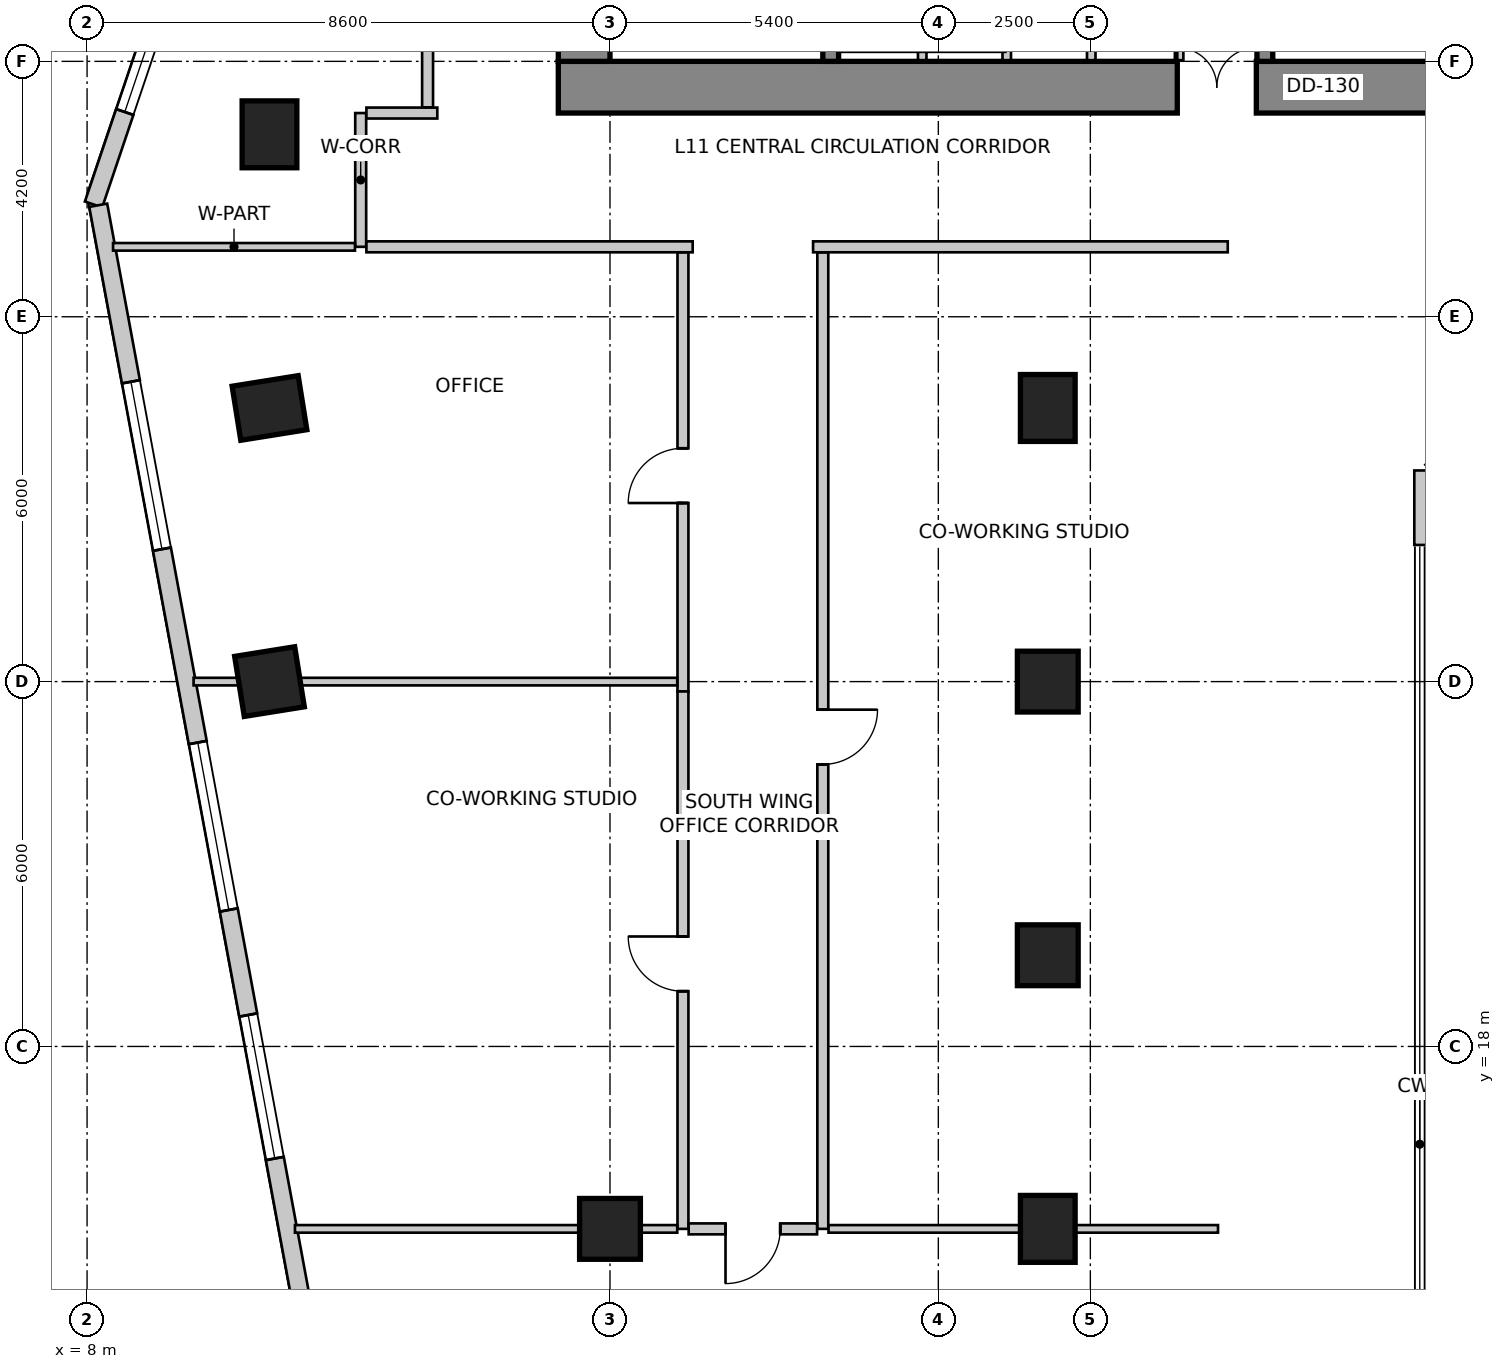
"""IFC4 building model, lengths in metres.
Left out: names, types, materials, properties, quantities, classifications, styles, units other than length and angle.
Written with IfcOpenShell. Run it as: python <this file> out.ifc"""

import sys

from ifc_helpers import new_model, si_unit, direction, frame, frame_2d, origin, origin_2d, place, context, subcontext, project, spatial, rectangle, extrude, source, transform, mapped, element, fill, save


model = new_model("IFC4")
c1 = context("Model", 3, precision=1e-05, world=origin(), true_north=direction((0.0, 1.0)))
c2 = subcontext(c1, "Body", "Model", "MODEL_VIEW")
j1 = project(units=[si_unit("LENGTHUNIT", "METRE"), si_unit("PLANEANGLEUNIT", "RADIAN")], contexts=[c1])
p1 = place(None, origin())
s1 = spatial("IfcSite", under=j1, at=p1, CompositionType="ELEMENT")
p2 = place(p1, origin())
s2 = spatial("IfcBuilding", under=s1, at=p2, CompositionType="ELEMENT")
p3 = place(p2, frame((0.0, 0.0, 47.0)))
s3 = spatial("IfcBuildingStorey", under=s2, at=p3, CompositionType="ELEMENT", Elevation=47.0)
p4 = place(p3, frame((15.75, 33.775, 0.0), z_axis=(0.0, 0.0, 1.0), x_axis=(1.0, 0.0, 0.0)))
e1 = element("IfcWall", 1, at=p4, inside=s3, PredefinedType="SHEAR", context=c2, shape_type="SweptSolid", body=[
    extrude(rectangle(XDim=16.1, YDim=0.85, at=frame_2d((8.05, 0.0))), origin(), (0.0, 0.0, 1.0), 4.0),
])
m1 = source(origin(), c2, "Body", "SweptSolid", [
    extrude(rectangle(XDim=1.3, YDim=2.15, at=frame_2d((0.65, 1.075))), frame((0.0, 0.435, 0.0), z_axis=(0.0, -1.0, 0.0), x_axis=(1.0, 0.0, 0.0)), (0.0, 0.0, 1.0), 0.87),
])
p5 = place(p4, frame((10.18, 0.0, 0.0)))
e2 = element("IfcOpeningElement", 2, at=p5, cuts=e1, PredefinedType="OPENING", context=c2, shape_type="MappedRepresentation", body=[
    mapped(m1, transform((0.0, 0.0, 0.0), scale=1.0)),
])
p6 = place(p3, frame((16.175, 34.2, 0.0), z_axis=(0.0, 0.0, 1.0), x_axis=(0.0, 1.0, 0.0)))
e3 = element("IfcWall", 3, at=p6, inside=s3, PredefinedType="SHEAR", context=c2, shape_type="SweptSolid", body=[
    extrude(rectangle(XDim=11.4, YDim=0.85, at=frame_2d((5.7, 0.0))), origin(), (0.0, 0.0, 1.0), 4.0),
])
m2 = source(origin(), c2, "Body", "SweptSolid", [
    extrude(rectangle(XDim=1.1, YDim=2.15, at=frame_2d((0.55, 1.075))), frame((0.0, 0.435, 0.0), z_axis=(0.0, -1.0, 0.0), x_axis=(1.0, 0.0, 0.0)), (0.0, 0.0, 1.0), 0.87),
])
p7 = place(p6, frame((7.15, 0.0, 0.0)))
e4 = element("IfcOpeningElement", 4, at=p7, cuts=e3, PredefinedType="OPENING", context=c2, shape_type="MappedRepresentation", body=[
    mapped(m2, transform((0.0, 0.0, 0.0), scale=1.0)),
])
p8 = place(p3, frame((20.23, 34.2, 0.0), z_axis=(0.0, 0.0, 1.0), x_axis=(0.0, 1.0, 0.0)))
e5 = element("IfcWall", 5, at=p8, inside=s3, PredefinedType="SHEAR", context=c2, shape_type="SweptSolid", body=[
    extrude(rectangle(XDim=9.06, YDim=0.26, at=frame_2d((4.53, 0.0))), origin(), (0.0, 0.0, 1.0), 4.0),
])
m3 = source(origin(), c2, "Body", "SweptSolid", [
    extrude(rectangle(XDim=1.1, YDim=2.15, at=frame_2d((0.55, 1.075))), frame((0.0, 0.14, 0.0), z_axis=(0.0, -1.0, 0.0), x_axis=(1.0, 0.0, 0.0)), (0.0, 0.0, 1.0), 0.28),
])
p9 = place(p8, frame((7.45, 0.0, 0.0)))
e6 = element("IfcOpeningElement", 6, at=p9, cuts=e5, PredefinedType="OPENING", context=c2, shape_type="MappedRepresentation", body=[
    mapped(m3, transform((0.0, 0.0, 0.0), scale=1.0)),
])
p10 = place(p3, frame((27.37, 34.2, 0.0), z_axis=(0.0, 0.0, 1.0), x_axis=(0.0, 1.0, 0.0)))
e7 = element("IfcWall", 7, at=p10, inside=s3, PredefinedType="SHEAR", context=c2, shape_type="SweptSolid", body=[
    extrude(rectangle(XDim=9.06, YDim=0.26, at=frame_2d((4.53, 0.0))), origin(), (0.0, 0.0, 1.0), 4.0),
])
p11 = place(p10, frame((7.45, 0.0, 0.0)))
e8 = element("IfcOpeningElement", 8, at=p11, cuts=e7, PredefinedType="OPENING", context=c2, shape_type="MappedRepresentation", body=[
    mapped(m3, transform((0.0, 0.0, 0.0), scale=1.0)),
])
m4 = source(origin(), c2, "Body", "SweptSolid", [
    extrude(rectangle(XDim=0.9, YDim=1.1, at=origin_2d()), origin(), (0.0, 0.0, 1.0), 4.0),
])
for number, where, z_axis, x_axis in (
    (9, (11.0, 33.0, 0.0), (0.0, 0.0, 1.0), (1.0, 0.0, 0.0)),
    (10, (11.0, 28.5, 0.0), (0.0, 0.0, 1.0), (0.158, -0.987, 0.0)),
):
    element("IfcColumn", number, at=place(p3, frame(where, z_axis=z_axis, x_axis=x_axis)), inside=s3, PredefinedType="COLUMN", context=c2, shape_type="MappedRepresentation", body=[
        mapped(m4, transform((0.0, 0.0, 0.0), scale=1.0)),
    ])
m5 = source(origin(), c2, "Body", "SweptSolid", [
    extrude(rectangle(XDim=1.0, YDim=1.0, at=origin_2d()), origin(), (0.0, 0.0, 1.0), 4.0),
])
p12 = place(p3, frame((11.0, 24.0, 0.0), z_axis=(0.0, 0.0, 1.0), x_axis=(0.158158067254, -0.987413806751, 0.0)))
e11 = element("IfcColumn", 11, at=p12, inside=s3, PredefinedType="COLUMN", context=c2, shape_type="MappedRepresentation", body=[
    mapped(m5, transform((0.0, 0.0, 0.0), scale=1.0)),
])
p13 = place(p3, frame((23.8, 28.5, 0.0), z_axis=(0.0, 0.0, 1.0), x_axis=(1.0, 0.0, 0.0)))
e12 = element("IfcColumn", 12, at=p13, inside=s3, PredefinedType="COLUMN", context=c2, shape_type="MappedRepresentation", body=[
    mapped(m4, transform((0.0, 0.0, 0.0), scale=1.0)),
])
for number, where, z_axis, x_axis in (
    (13, (23.8, 24.0, 0.0), (0.0, 0.0, 1.0), (1.0, 0.0, 0.0)),
    (14, (23.8, 19.5, 0.0), (0.0, 0.0, 1.0), (1.0, 0.0, 0.0)),
):
    element("IfcColumn", number, at=place(p3, frame(where, z_axis=z_axis, x_axis=x_axis)), inside=s3, PredefinedType="COLUMN", context=c2, shape_type="MappedRepresentation", body=[
        mapped(m5, transform((0.0, 0.0, 0.0), scale=1.0)),
    ])
p14 = place(p3, frame((23.8, 15.0, 0.0), z_axis=(0.0, 0.0, 1.0), x_axis=(1.0, 0.0, 0.0)))
e15 = element("IfcColumn", 15, at=p14, inside=s3, PredefinedType="COLUMN", context=c2, shape_type="MappedRepresentation", body=[
    mapped(m4, transform((0.0, 0.0, 0.0), scale=1.0)),
])
p15 = place(p3, frame((16.6, 15.0, 0.0), z_axis=(0.0, 0.0, 1.0), x_axis=(1.0, 0.0, 0.0)))
e16 = element("IfcColumn", 16, at=p15, inside=s3, PredefinedType="COLUMN", context=c2, shape_type="MappedRepresentation", body=[
    mapped(m5, transform((0.0, 0.0, 0.0), scale=1.0)),
])
p16 = place(p3, frame((29.978, 26.247, 0.0), z_axis=(0.0, 0.0, 1.0), x_axis=(0.0, 1.0, 0.0)))
e17 = element("IfcWall", 17, at=p16, inside=s3, PredefinedType="SOLIDWALL", context=c2, shape_type="SweptSolid", body=[
    extrude(rectangle(XDim=1.225, YDim=0.3, at=frame_2d((0.613, 0.0))), origin(), (0.0, 0.0, 1.0), 3.75),
])
p17 = place(p3, frame((13.269, 47.134, 0.0), z_axis=(0.0, 0.0, 1.0), x_axis=(-0.319920423265, -0.947444416722, 0.0)))
e18 = element("IfcWall", 18, at=p17, inside=s3, PredefinedType="SOLIDWALL", context=c2, shape_type="SweptSolid", body=[
    extrude(rectangle(XDim=16.135, YDim=0.3, at=frame_2d((8.067, 0.0))), origin(), (0.0, 0.0, 1.0), 3.75),
])
m6 = source(origin(), c2, "Body", "SweptSolid", [
    extrude(rectangle(XDim=2.4, YDim=2.2, at=frame_2d((1.2, 1.1))), frame((0.0, 0.16, 0.0), z_axis=(0.0, -1.0, 0.0), x_axis=(1.0, 0.0, 0.0)), (0.0, 0.0, 1.0), 0.32),
])
p18 = place(p17, frame((2.188, 0.0, 0.85)))
e19 = element("IfcOpeningElement", 19, at=p18, cuts=e18, PredefinedType="OPENING", context=c2, shape_type="MappedRepresentation", body=[
    mapped(m6, transform((0.0, 0.0, 0.0), scale=1.0)),
])
m7 = source(origin(), c2, "Body", "SweptSolid", [
    extrude(rectangle(XDim=2.8, YDim=2.4, at=frame_2d((1.4, 1.2))), frame((0.0, 0.16, 0.0), z_axis=(0.0, -1.0, 0.0), x_axis=(1.0, 0.0, 0.0)), (0.0, 0.0, 1.0), 0.32),
])
p19 = place(p17, frame((6.959, 0.0, 0.85)))
e20 = element("IfcOpeningElement", 20, at=p19, cuts=e18, PredefinedType="OPENING", context=c2, shape_type="MappedRepresentation", body=[
    mapped(m7, transform((0.0, 0.0, 0.0), scale=1.0)),
])
p20 = place(p17, frame((12.13, 0.0, 0.85)))
e21 = element("IfcOpeningElement", 21, at=p20, cuts=e18, PredefinedType="OPENING", context=c2, shape_type="MappedRepresentation", body=[
    mapped(m6, transform((0.0, 0.0, 0.0), scale=1.0)),
])
p21 = place(p3, frame((8.183, 31.833, 0.0), z_axis=(0.0, 0.0, 1.0), x_axis=(0.18216364648, -0.983268226834, 0.0)))
e22 = element("IfcWall", 22, at=p21, inside=s3, PredefinedType="SOLIDWALL", context=c2, shape_type="SweptSolid", body=[
    extrude(rectangle(XDim=26.678, YDim=0.3, at=frame_2d((13.339, 0.0))), origin(), (0.0, 0.0, 1.0), 3.75),
])
p22 = place(p21, frame((2.952, 0.0, 0.85)))
e23 = element("IfcOpeningElement", 23, at=p22, cuts=e22, PredefinedType="OPENING", context=c2, shape_type="MappedRepresentation", body=[
    mapped(m7, transform((0.0, 0.0, 0.0), scale=1.0)),
])
p23 = place(p21, frame((8.986, 0.0, 0.85)))
e24 = element("IfcOpeningElement", 24, at=p23, cuts=e22, PredefinedType="OPENING", context=c2, shape_type="MappedRepresentation", body=[
    mapped(m7, transform((0.0, 0.0, 0.0), scale=1.0)),
])
p24 = place(p21, frame((13.543, 0.0, 0.85)))
e25 = element("IfcOpeningElement", 25, at=p24, cuts=e22, PredefinedType="OPENING", context=c2, shape_type="MappedRepresentation", body=[
    mapped(m6, transform((0.0, 0.0, 0.0), scale=1.0)),
])
p25 = place(p21, frame((18.211, 0.0, 0.85)))
e26 = element("IfcOpeningElement", 26, at=p25, cuts=e22, PredefinedType="OPENING", context=c2, shape_type="MappedRepresentation", body=[
    mapped(m7, transform((0.0, 0.0, 0.0), scale=1.0)),
])
p26 = place(p21, frame((22.909, 0.0, 0.85)))
e27 = element("IfcOpeningElement", 27, at=p26, cuts=e22, PredefinedType="OPENING", context=c2, shape_type="MappedRepresentation", body=[
    mapped(m6, transform((0.0, 0.0, 0.0), scale=1.0)),
])
for number, where, z_axis, x_axis in (
    (28, (25.96, 34.22, 0.0), (0.0, 0.0, 1.0), (0.0, 1.0, 0.0)),
    (29, (21.735, 34.22, 0.0), (0.0, 0.0, 1.0), (0.0, 1.0, 0.0)),
    (30, (23.125, 34.22, 0.0), (0.0, 0.0, 1.0), (0.0, 1.0, 0.0)),
    (31, (24.515, 34.22, 0.0), (0.0, 0.0, 1.0), (0.0, 1.0, 0.0)),
):
    element("IfcWall", number, at=place(p3, frame(where, z_axis=z_axis, x_axis=x_axis)), inside=s3, PredefinedType="SOLIDWALL", context=c2, shape_type="SweptSolid", body=[
        extrude(rectangle(XDim=1.62, YDim=0.14, at=frame_2d((0.81, 0.0))), origin(), (0.0, 0.0, 1.0), 3.042),
    ])
p27 = place(p3, frame((12.5, 31.15, 0.0), z_axis=(0.0, 0.0, 1.0), x_axis=(0.0, 1.0, 0.0)))
e32 = element("IfcWall", 32, at=p27, inside=s3, PredefinedType="PARTITIONING", context=c2, shape_type="SweptSolid", body=[
    extrude(rectangle(XDim=2.2, YDim=0.18, at=frame_2d((1.1, 0.0))), origin(), (0.0, 0.0, 1.0), 3.434),
])
p28 = place(p3, frame((12.594, 33.35, 0.0), z_axis=(0.0, 0.0, 1.0), x_axis=(1.0, 0.0, 0.0)))
e33 = element("IfcWall", 33, at=p28, inside=s3, PredefinedType="PARTITIONING", context=c2, shape_type="SweptSolid", body=[
    extrude(rectangle(XDim=1.166, YDim=0.18, at=frame_2d((0.583, 0.0))), origin(), (0.0, 0.0, 1.0), 3.75),
])
p29 = place(p3, frame((17.96, 31.15, 0.0), z_axis=(0.0, 0.0, 1.0), x_axis=(-1.0, 0.0, 0.0)))
e34 = element("IfcWall", 34, at=p29, inside=s3, PredefinedType="PARTITIONING", context=c2, shape_type="SweptSolid", body=[
    extrude(rectangle(XDim=5.366, YDim=0.18, at=frame_2d((2.683, 0.0))), origin(), (0.0, 0.0, 1.0), 3.434),
])
p30 = place(p3, frame((26.76, 31.15, 0.0), z_axis=(0.0, 0.0, 1.0), x_axis=(-1.0, 0.0, 0.0)))
e35 = element("IfcWall", 35, at=p30, inside=s3, PredefinedType="PARTITIONING", context=c2, shape_type="SweptSolid", body=[
    extrude(rectangle(XDim=6.82, YDim=0.18, at=frame_2d((3.41, 0.0))), origin(), (0.0, 0.0, 1.0), 3.434),
])
p31 = place(p3, frame((13.6, 33.444, 0.0), z_axis=(0.0, 0.0, 1.0), x_axis=(0.0, 1.0, 0.0)))
e36 = element("IfcWall", 36, at=p31, inside=s3, PredefinedType="PARTITIONING", context=c2, shape_type="SweptSolid", body=[
    extrude(rectangle(XDim=13.896, YDim=0.18, at=frame_2d((6.948, 0.0))), origin(), (0.0, 0.0, 1.0), 2.892),
])
m8 = source(origin(), c2, "Body", "SweptSolid", [
    extrude(rectangle(XDim=0.9, YDim=2.15, at=frame_2d((0.45, 1.075))), frame((0.0, 0.1, 0.0), z_axis=(0.0, -1.0, 0.0), x_axis=(1.0, 0.0, 0.0)), (0.0, 0.0, 1.0), 0.2),
])
p32 = place(p31, frame((4.144, 0.0, 0.0)))
e37 = element("IfcOpeningElement", 37, at=p32, cuts=e36, PredefinedType="OPENING", context=c2, shape_type="MappedRepresentation", body=[
    mapped(m8, transform((0.0, 0.0, 0.0), scale=1.0)),
])
p33 = place(p3, frame((12.406, 31.15, 0.0), z_axis=(0.0, 0.0, 1.0), x_axis=(-1.0, 0.0, 0.0)))
e38 = element("IfcWall", 38, at=p33, inside=s3, PredefinedType="PARTITIONING", context=c2, shape_type="SweptSolid", body=[
    extrude(rectangle(XDim=3.979, YDim=0.125, at=frame_2d((1.99, 0.0))), origin(), (0.0, 0.0, 1.0), 2.892),
])
p34 = place(p3, frame((17.8, 23.84, 0.0), z_axis=(0.0, 0.0, 1.0), x_axis=(0.0, 1.0, 0.0)))
e39 = element("IfcWall", 39, at=p34, inside=s3, PredefinedType="PARTITIONING", context=c2, shape_type="SweptSolid", body=[
    extrude(rectangle(XDim=7.216, YDim=0.18, at=frame_2d((3.608, 0.0))), origin(), (0.0, 0.0, 1.0), 3.125),
])
p35 = place(p34, frame((3.097, 0.0, 0.0)))
e40 = element("IfcOpeningElement", 40, at=p35, cuts=e39, PredefinedType="OPENING", context=c2, shape_type="MappedRepresentation", body=[
    mapped(m8, transform((0.0, 0.0, 0.0), scale=1.0)),
])
p36 = place(p3, frame((17.8, 15.0, 0.0), z_axis=(0.0, 0.0, 1.0), x_axis=(0.0, 1.0, 0.0)))
e41 = element("IfcWall", 41, at=p36, inside=s3, PredefinedType="PARTITIONING", context=c2, shape_type="SweptSolid", body=[
    extrude(rectangle(XDim=8.838, YDim=0.18, at=frame_2d((4.419, 0.0))), origin(), (0.0, 0.0, 1.0), 2.892),
])
p37 = place(p36, frame((3.908, 0.0, 0.0)))
e42 = element("IfcOpeningElement", 42, at=p37, cuts=e41, PredefinedType="OPENING", context=c2, shape_type="MappedRepresentation", body=[
    mapped(m8, transform((0.0, 0.0, 0.0), scale=1.0)),
])
p38 = place(p3, frame((20.1, 31.056, 0.0), z_axis=(0.0, 0.0, 1.0), x_axis=(0.0, -1.0, 0.0)))
e43 = element("IfcWall", 43, at=p38, inside=s3, PredefinedType="PARTITIONING", context=c2, shape_type="SweptSolid", body=[
    extrude(rectangle(XDim=16.056, YDim=0.18, at=frame_2d((8.028, 0.0))), origin(), (0.0, 0.0, 1.0), 2.892),
])
p39 = place(p38, frame((7.518, 0.0, 0.0)))
e44 = element("IfcOpeningElement", 44, at=p39, cuts=e43, PredefinedType="OPENING", context=c2, shape_type="MappedRepresentation", body=[
    mapped(m8, transform((0.0, 0.0, 0.0), scale=1.0)),
])
p40 = place(p3, frame((20.006, 15.0, 0.0), z_axis=(0.0, 0.0, 1.0), x_axis=(-1.0, 0.0, 0.0)))
e45 = element("IfcWall", 45, at=p40, inside=s3, PredefinedType="PARTITIONING", context=c2, shape_type="SweptSolid", body=[
    extrude(rectangle(XDim=2.112, YDim=0.18, at=frame_2d((1.056, 0.0))), origin(), (0.0, 0.0, 1.0), 2.892),
])
p41 = place(p40, frame((0.606, 0.0, 0.0)))
e46 = element("IfcOpeningElement", 46, at=p41, cuts=e45, PredefinedType="OPENING", context=c2, shape_type="MappedRepresentation", body=[
    mapped(m8, transform((0.0, 0.0, 0.0), scale=1.0)),
])
p42 = place(p3, frame((17.706, 24.0, 0.0), z_axis=(0.0, 0.0, 1.0), x_axis=(-1.0, 0.0, 0.0)))
e47 = element("IfcWall", 47, at=p42, inside=s3, PredefinedType="PARTITIONING", context=c2, shape_type="SweptSolid", body=[
    extrude(rectangle(XDim=7.954, YDim=0.125, at=frame_2d((3.977, 0.0))), origin(), (0.0, 0.0, 1.0), 2.892),
])
p43 = place(p3, frame((17.706, 15.0, 0.0), z_axis=(0.0, 0.0, 1.0), x_axis=(-1.0, 0.0, 0.0)))
e48 = element("IfcWall", 48, at=p43, inside=s3, PredefinedType="PARTITIONING", context=c2, shape_type="SweptSolid", body=[
    extrude(rectangle(XDim=6.287, YDim=0.125, at=frame_2d((3.144, 0.0))), origin(), (0.0, 0.0, 1.0), 2.892),
])
p44 = place(p3, frame((26.6, 15.0, 0.0), z_axis=(0.0, 0.0, 1.0), x_axis=(-1.0, 0.0, 0.0)))
e49 = element("IfcWall", 49, at=p44, inside=s3, PredefinedType="PARTITIONING", context=c2, shape_type="SweptSolid", body=[
    extrude(rectangle(XDim=6.406, YDim=0.125, at=frame_2d((3.203, 0.0))), origin(), (0.0, 0.0, 1.0), 2.892),
])
m9 = source(origin(), c2, "Body", "SweptSolid", [
    extrude(rectangle(XDim=2.4, YDim=2.2, at=frame_2d((1.2, 1.1))), frame((0.0, -0.015, 0.0), z_axis=(0.0, -1.0, 0.0), x_axis=(1.0, 0.0, 0.0)), (0.0, 0.0, 1.0), 0.06),
])
p45 = place(p20, origin())
e50 = element("IfcWindow", 50, at=p45, inside=s3, PartitioningType="SINGLE_PANEL", PredefinedType="WINDOW", context=c2, shape_type="MappedRepresentation", body=[
    mapped(m9, transform((0.0, 0.0, 0.0), scale=1.0)),
])
fill(e21, e50)
m10 = source(origin(), c2, "Body", "SweptSolid", [
    extrude(rectangle(XDim=2.8, YDim=2.4, at=frame_2d((1.4, 1.2))), frame((0.0, -0.015, 0.0), z_axis=(0.0, -1.0, 0.0), x_axis=(1.0, 0.0, 0.0)), (0.0, 0.0, 1.0), 0.06),
])
p46 = place(p22, origin())
e51 = element("IfcWindow", 51, at=p46, inside=s3, PartitioningType="SINGLE_PANEL", PredefinedType="WINDOW", context=c2, shape_type="MappedRepresentation", body=[
    mapped(m10, transform((0.0, 0.0, 0.0), scale=1.0)),
])
fill(e23, e51)
p47 = place(p23, origin())
e52 = element("IfcWindow", 52, at=p47, inside=s3, PartitioningType="SINGLE_PANEL", PredefinedType="WINDOW", context=c2, shape_type="MappedRepresentation", body=[
    mapped(m10, transform((0.0, 0.0, 0.0), scale=1.0)),
])
fill(e24, e52)
p48 = place(p24, origin())
e53 = element("IfcWindow", 53, at=p48, inside=s3, PartitioningType="SINGLE_PANEL", PredefinedType="WINDOW", context=c2, shape_type="MappedRepresentation", body=[
    mapped(m9, transform((0.0, 0.0, 0.0), scale=1.0)),
])
fill(e25, e53)
m11 = source(origin(), c2, "Body", "SweptSolid", [
    extrude(rectangle(XDim=1.3, YDim=2.15, at=frame_2d((0.65, 1.075))), frame((0.0, 0.025, 0.0), z_axis=(0.0, -1.0, 0.0), x_axis=(1.0, 0.0, 0.0)), (0.0, 0.0, 1.0), 0.05),
])
p49 = place(p5, origin())
e54 = element("IfcDoor", 54, at=p49, inside=s3, OperationType="DOUBLE_DOOR_SINGLE_SWING", PredefinedType="DOOR", context=c2, shape_type="MappedRepresentation", body=[
    mapped(m11, transform((0.0, 0.0, 0.0), scale=1.0)),
])
fill(e2, e54)
m12 = source(origin(), c2, "Body", "SweptSolid", [
    extrude(rectangle(XDim=0.9, YDim=2.15, at=frame_2d((0.45, 1.075))), frame((0.0, 0.025, 0.0), z_axis=(0.0, -1.0, 0.0), x_axis=(1.0, 0.0, 0.0)), (0.0, 0.0, 1.0), 0.05),
])
p50 = place(p35, origin())
e55 = element("IfcDoor", 55, at=p50, inside=s3, OperationType="SINGLE_SWING_LEFT", PredefinedType="DOOR", context=c2, shape_type="MappedRepresentation", body=[
    mapped(m12, transform((0.0, 0.0, 0.0), scale=1.0)),
])
fill(e40, e55)
p51 = place(p37, origin())
e56 = element("IfcDoor", 56, at=p51, inside=s3, OperationType="SINGLE_SWING_RIGHT", PredefinedType="DOOR", context=c2, shape_type="MappedRepresentation", body=[
    mapped(m12, transform((0.0, 0.0, 0.0), scale=1.0)),
])
fill(e42, e56)
p52 = place(p39, origin())
e57 = element("IfcDoor", 57, at=p52, inside=s3, OperationType="SINGLE_SWING_LEFT", PredefinedType="DOOR", context=c2, shape_type="MappedRepresentation", body=[
    mapped(m12, transform((0.0, 0.0, 0.0), scale=1.0)),
])
fill(e44, e57)
p53 = place(p41, origin())
e58 = element("IfcDoor", 58, at=p53, inside=s3, OperationType="SINGLE_SWING_RIGHT", PredefinedType="DOOR", context=c2, shape_type="MappedRepresentation", body=[
    mapped(m12, transform((0.0, 0.0, 0.0), scale=1.0)),
])
fill(e46, e58)
save(model, sys.argv[1])
